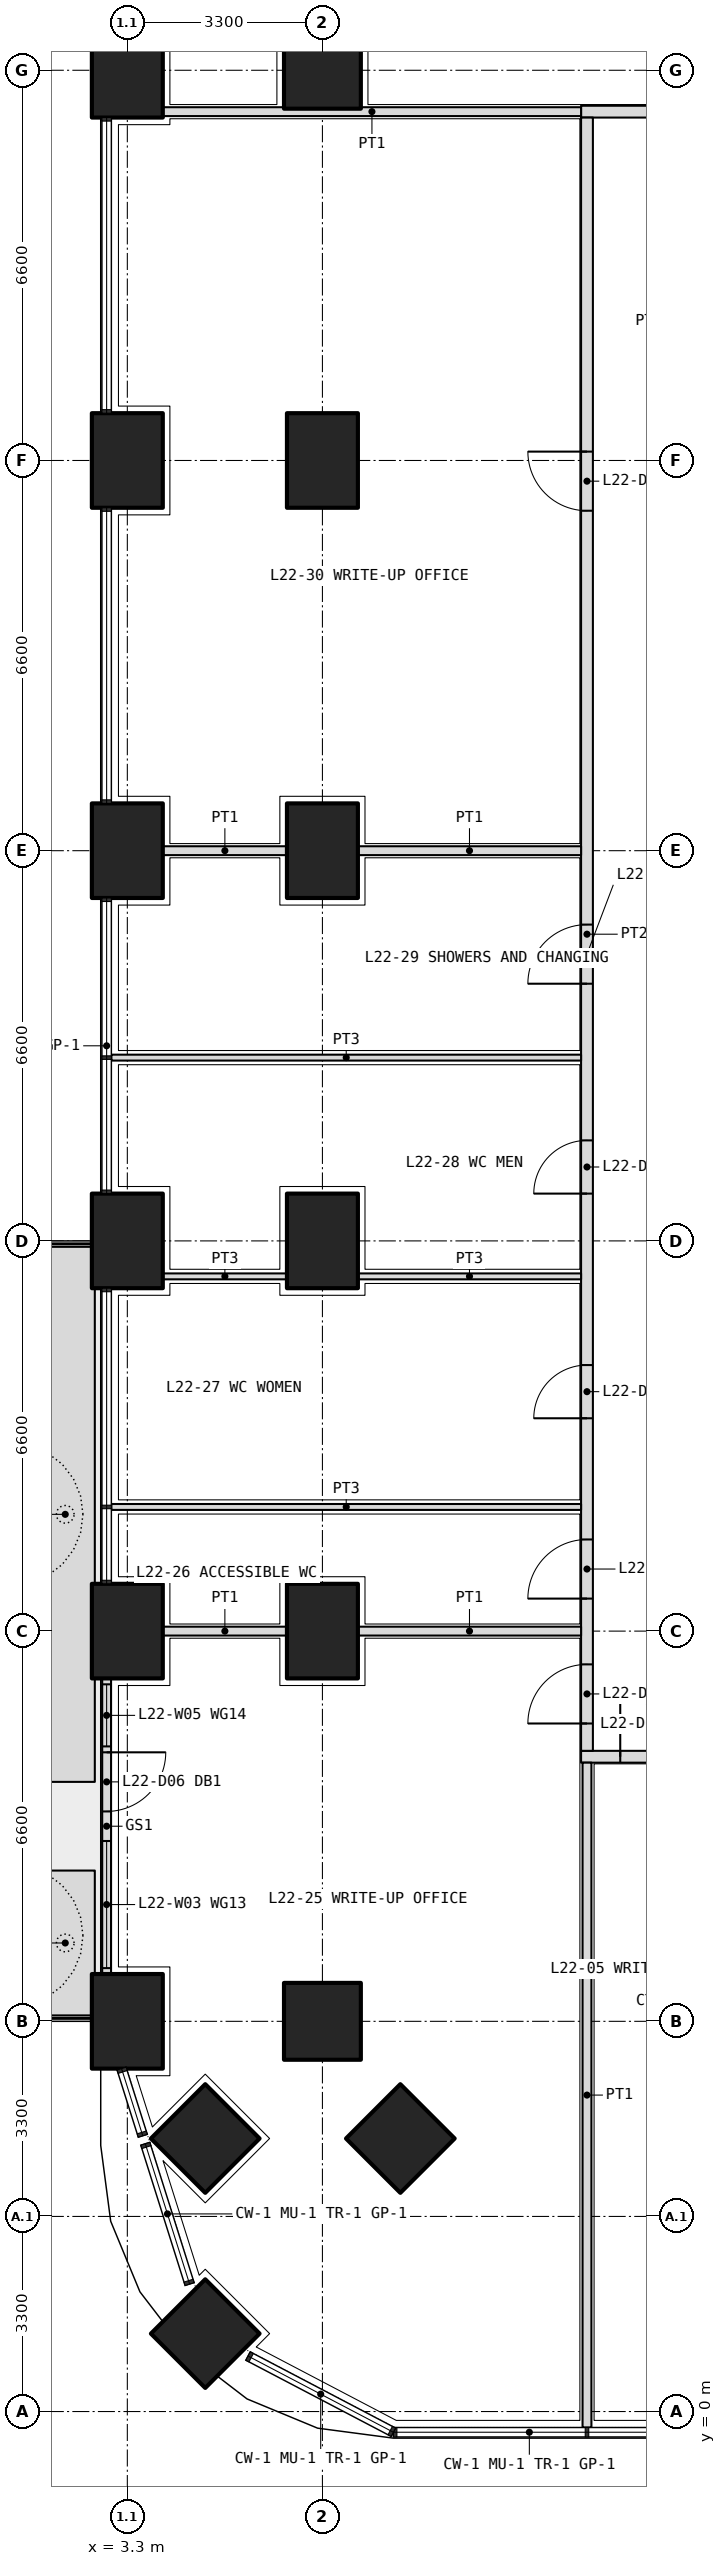
"""IFC4 building model, lengths in metres.
Left out: names, types, materials, properties, quantities, classifications, styles, units other than length and angle.
Written with IfcOpenShell. Run it as: python <this file> out.ifc"""

import sys

from ifc_helpers import new_model, si_unit, direction, frame, frame_2d, origin, origin_2d, place, context, subcontext, project, spatial, polyline, rectangle, outline, extrude, element, fill, save


model = new_model("IFC4")
c1 = context("Model", 3, precision=1e-05, world=origin(), true_north=direction((0.0, 1.0)))
c2 = subcontext(c1, "Body", "Model", "MODEL_VIEW")
j1 = project(units=[si_unit("LENGTHUNIT", "METRE"), si_unit("PLANEANGLEUNIT", "RADIAN")], contexts=[c1])
p1 = place(None, origin())
s1 = spatial("IfcSite", under=j1, at=p1, CompositionType="ELEMENT")
p2 = place(p1, origin())
s2 = spatial("IfcBuilding", under=s1, at=p2, CompositionType="ELEMENT")
p3 = place(p2, frame((0.0, 0.0, 99.0)))
s3 = spatial("IfcBuildingStorey", under=s2, at=p3, CompositionType="ELEMENT", Elevation=99.0)
p4 = place(p3, frame((4.618, 1.318, 0.0), z_axis=(0.0, 0.0, 1.0), x_axis=(0.707106781187, 0.707106781187, 0.0)))
e1 = element("IfcColumn", 1, at=p4, inside=s3, PredefinedType="COLUMN", context=c2, shape_type="SweptSolid", body=[
    extrude(rectangle(XDim=1.3, YDim=1.3, at=origin_2d()), origin(), (0.0, 0.0, 1.0), 4.2),
])
for number, where, z_axis, x_axis in (
    (2, (3.3, 6.6, 0.0), (0.0, 0.0, 1.0), (0.0, 1.0, 0.0)),
    (3, (3.3, 13.2, 0.0), (0.0, 0.0, 1.0), (0.0, 1.0, 0.0)),
    (4, (3.3, 19.8, 0.0), (0.0, 0.0, 1.0), (0.0, 1.0, 0.0)),
    (5, (3.3, 26.4, 0.0), (0.0, 0.0, 1.0), (0.0, 1.0, 0.0)),
    (6, (3.3, 33.0, 0.0), (0.0, 0.0, 1.0), (0.0, 1.0, 0.0)),
    (7, (3.3, 39.6, 0.0), (0.0, 0.0, 1.0), (0.0, 1.0, 0.0)),
):
    element("IfcColumn", number, at=place(p3, frame(where, z_axis=z_axis, x_axis=x_axis)), inside=s3, PredefinedType="COLUMN", context=c2, shape_type="SweptSolid", body=[
        extrude(rectangle(XDim=1.6, YDim=1.2, at=origin_2d()), origin(), (0.0, 0.0, 1.0), 4.2),
    ])
for number, where, z_axis, x_axis in (
    (8, (6.6, 6.6, 0.0), (0.0, 0.0, 1.0), (1.0, 0.0, 0.0)),
    (9, (6.6, 39.6, 0.0), (0.0, 0.0, 1.0), (1.0, 0.0, 0.0)),
    (10, (4.618, 4.618, 0.0), (0.0, 0.0, 1.0), (0.707, 0.707, 0.0)),
    (11, (7.918, 4.618, 0.0), (0.0, 0.0, 1.0), (0.707, 0.707, 0.0)),
):
    element("IfcColumn", number, at=place(p3, frame(where, z_axis=z_axis, x_axis=x_axis)), inside=s3, PredefinedType="COLUMN", context=c2, shape_type="SweptSolid", body=[
        extrude(rectangle(XDim=1.3, YDim=1.3, at=origin_2d()), origin(), (0.0, 0.0, 1.0), 4.2),
    ])
for number, where, z_axis, x_axis in (
    (12, (6.6, 13.2, 0.0), (0.0, 0.0, 1.0), (0.0, 1.0, 0.0)),
    (13, (6.6, 19.8, 0.0), (0.0, 0.0, 1.0), (0.0, 1.0, 0.0)),
    (14, (6.6, 26.4, 0.0), (0.0, 0.0, 1.0), (0.0, 1.0, 0.0)),
    (15, (6.6, 33.0, 0.0), (0.0, 0.0, 1.0), (0.0, 1.0, 0.0)),
):
    element("IfcColumn", number, at=place(p3, frame(where, z_axis=z_axis, x_axis=x_axis)), inside=s3, PredefinedType="COLUMN", context=c2, shape_type="SweptSolid", body=[
        extrude(rectangle(XDim=1.6, YDim=1.2, at=origin_2d()), origin(), (0.0, 0.0, 1.0), 4.2),
    ])
p5 = place(p3, origin())
e16 = element("IfcWall", 16, at=p5, inside=s3, PredefinedType="USERDEFINED", context=c2, shape_type="SweptSolid", body=[
    extrude(outline(polyline([(1.75, 6.7), (2.75, 6.7), (2.75, 9.15), (1.75, 9.15), (1.75, 6.7)]), holes=[polyline([(1.9, 6.85), (2.6, 6.85), (2.6, 9.0), (1.9, 9.0), (1.9, 6.85)])]), origin(), (0.0, 0.0, 1.0), 1.05),
])
p6 = place(p3, origin())
e17 = element("IfcWall", 17, at=p6, inside=s3, PredefinedType="USERDEFINED", context=c2, shape_type="SweptSolid", body=[
    extrude(outline(polyline([(1.75, 10.65), (2.75, 10.65), (2.75, 19.7), (1.75, 19.7), (1.75, 10.65)]), holes=[polyline([(1.9, 10.8), (2.6, 10.8), (2.6, 19.55), (1.9, 19.55), (1.9, 10.8)])]), origin(), (0.0, 0.0, 1.0), 1.05),
])
p7 = place(p3, frame((2.95, 12.4, 0.0), z_axis=(0.0, 0.0, 1.0), x_axis=(0.0, -1.0, 0.0)))
e18 = element("IfcWall", 18, at=p7, inside=s3, PredefinedType="SOLIDWALL", context=c2, shape_type="SweptSolid", body=[
    extrude(rectangle(XDim=5.0, YDim=0.15, at=frame_2d((2.5, 0.0))), origin(), (0.0, 0.0, 1.0), 2.7),
])
p8 = place(p7, frame((1.25, 0.0, 0.0)))
e19 = element("IfcOpeningElement", 19, at=p8, cuts=e18, PredefinedType="OPENING", context=c2, shape_type="SweptSolid", body=[
    extrude(rectangle(XDim=1.0, YDim=2.4, at=frame_2d((0.5, 1.2))), frame((0.0, 0.085, 0.0), z_axis=(0.0, -1.0, 0.0), x_axis=(1.0, 0.0, 0.0)), (0.0, 0.0, 1.0), 0.17),
])
p9 = place(p7, frame((0.1, 0.0, 0.1)))
e20 = element("IfcOpeningElement", 20, at=p9, cuts=e18, PredefinedType="OPENING", context=c2, shape_type="SweptSolid", body=[
    extrude(rectangle(XDim=1.05, YDim=2.3, at=frame_2d((0.525, 1.15))), frame((0.0, 0.085, 0.0), z_axis=(0.0, -1.0, 0.0), x_axis=(1.0, 0.0, 0.0)), (0.0, 0.0, 1.0), 0.17),
])
p10 = place(p7, frame((2.75, 0.0, 0.1)))
e21 = element("IfcOpeningElement", 21, at=p10, cuts=e18, PredefinedType="OPENING", context=c2, shape_type="SweptSolid", body=[
    extrude(rectangle(XDim=2.15, YDim=2.3, at=frame_2d((1.075, 1.15))), frame((0.0, 0.085, 0.0), z_axis=(0.0, -1.0, 0.0), x_axis=(1.0, 0.0, 0.0)), (0.0, 0.0, 1.0), 0.17),
])
p11 = place(p3, frame((10.975, 11.075, 0.0), z_axis=(0.0, 0.0, 1.0), x_axis=(1.0, 0.0, 0.0)))
e22 = element("IfcWall", 22, at=p11, inside=s3, PredefinedType="PARTITIONING", context=c2, shape_type="SweptSolid", body=[
    extrude(rectangle(XDim=30.85, YDim=0.2, at=frame_2d((15.425, 0.0))), origin(), (0.0, 0.0, 1.0), 2.85),
])
p12 = place(p11, frame((0.663, 0.0, 0.0)))
e23 = element("IfcOpeningElement", 23, at=p12, cuts=e22, PredefinedType="OPENING", context=c2, shape_type="SweptSolid", body=[
    extrude(rectangle(XDim=1.0, YDim=2.1, at=frame_2d((0.5, 1.05))), frame((0.0, 0.11, 0.0), z_axis=(0.0, -1.0, 0.0), x_axis=(1.0, 0.0, 0.0)), (0.0, 0.0, 1.0), 0.22),
])
p13 = place(p11, frame((3.275, 0.0, 0.0)))
e24 = element("IfcOpeningElement", 24, at=p13, cuts=e22, PredefinedType="OPENING", context=c2, shape_type="SweptSolid", body=[
    extrude(rectangle(XDim=1.2, YDim=2.1, at=frame_2d((0.6, 1.05))), frame((0.0, 0.11, 0.0), z_axis=(0.0, -1.0, 0.0), x_axis=(1.0, 0.0, 0.0)), (0.0, 0.0, 1.0), 0.22),
])
p14 = place(p11, frame((8.325, 0.0, 0.0)))
e25 = element("IfcOpeningElement", 25, at=p14, cuts=e22, PredefinedType="OPENING", context=c2, shape_type="SweptSolid", body=[
    extrude(rectangle(XDim=1.0, YDim=2.1, at=frame_2d((0.5, 1.05))), frame((0.0, 0.11, 0.0), z_axis=(0.0, -1.0, 0.0), x_axis=(1.0, 0.0, 0.0)), (0.0, 0.0, 1.0), 0.22),
])
p15 = place(p11, frame((13.275, 0.0, 0.0)))
e26 = element("IfcOpeningElement", 26, at=p15, cuts=e22, PredefinedType="OPENING", context=c2, shape_type="SweptSolid", body=[
    extrude(rectangle(XDim=1.0, YDim=2.1, at=frame_2d((0.5, 1.05))), frame((0.0, 0.11, 0.0), z_axis=(0.0, -1.0, 0.0), x_axis=(1.0, 0.0, 0.0)), (0.0, 0.0, 1.0), 0.22),
])
p16 = place(p11, frame((17.025, 0.0, 0.0)))
e27 = element("IfcOpeningElement", 27, at=p16, cuts=e22, PredefinedType="OPENING", context=c2, shape_type="SweptSolid", body=[
    extrude(rectangle(XDim=1.0, YDim=2.1, at=frame_2d((0.5, 1.05))), frame((0.0, 0.11, 0.0), z_axis=(0.0, -1.0, 0.0), x_axis=(1.0, 0.0, 0.0)), (0.0, 0.0, 1.0), 0.22),
])
p17 = place(p11, frame((20.325, 0.0, 0.0)))
e28 = element("IfcOpeningElement", 28, at=p17, cuts=e22, PredefinedType="OPENING", context=c2, shape_type="SweptSolid", body=[
    extrude(rectangle(XDim=1.0, YDim=2.1, at=frame_2d((0.5, 1.05))), frame((0.0, 0.11, 0.0), z_axis=(0.0, -1.0, 0.0), x_axis=(1.0, 0.0, 0.0)), (0.0, 0.0, 1.0), 0.22),
])
p18 = place(p11, frame((25.887, 0.0, 0.0)))
e29 = element("IfcOpeningElement", 29, at=p18, cuts=e22, PredefinedType="OPENING", context=c2, shape_type="SweptSolid", body=[
    extrude(rectangle(XDim=1.0, YDim=2.1, at=frame_2d((0.5, 1.05))), frame((0.0, 0.11, 0.0), z_axis=(0.0, -1.0, 0.0), x_axis=(1.0, 0.0, 0.0)), (0.0, 0.0, 1.0), 0.22),
])
p19 = place(p3, frame((10.975, 38.9, 0.0), z_axis=(0.0, 0.0, 1.0), x_axis=(1.0, 0.0, 0.0)))
e30 = element("IfcWall", 30, at=p19, inside=s3, PredefinedType="PARTITIONING", context=c2, shape_type="SweptSolid", body=[
    extrude(rectangle(XDim=30.85, YDim=0.2, at=frame_2d((15.425, 0.0))), origin(), (0.0, 0.0, 1.0), 2.85),
])
p20 = place(p19, frame((5.613, 0.0, 0.0)))
e31 = element("IfcOpeningElement", 31, at=p20, cuts=e30, PredefinedType="OPENING", context=c2, shape_type="SweptSolid", body=[
    extrude(rectangle(XDim=1.0, YDim=2.1, at=frame_2d((0.5, 1.05))), frame((0.0, 0.11, 0.0), z_axis=(0.0, -1.0, 0.0), x_axis=(1.0, 0.0, 0.0)), (0.0, 0.0, 1.0), 0.22),
])
p21 = place(p19, frame((16.575, 0.0, 0.0)))
e32 = element("IfcOpeningElement", 32, at=p21, cuts=e30, PredefinedType="OPENING", context=c2, shape_type="SweptSolid", body=[
    extrude(rectangle(XDim=1.0, YDim=2.1, at=frame_2d((0.5, 1.05))), frame((0.0, 0.11, 0.0), z_axis=(0.0, -1.0, 0.0), x_axis=(1.0, 0.0, 0.0)), (0.0, 0.0, 1.0), 0.22),
])
p22 = place(p19, frame((23.175, 0.0, 0.0)))
e33 = element("IfcOpeningElement", 33, at=p22, cuts=e30, PredefinedType="OPENING", context=c2, shape_type="SweptSolid", body=[
    extrude(rectangle(XDim=1.0, YDim=2.1, at=frame_2d((0.5, 1.05))), frame((0.0, 0.11, 0.0), z_axis=(0.0, -1.0, 0.0), x_axis=(1.0, 0.0, 0.0)), (0.0, 0.0, 1.0), 0.22),
])
p23 = place(p19, frame((27.538, 0.0, 0.0)))
e34 = element("IfcOpeningElement", 34, at=p23, cuts=e30, PredefinedType="OPENING", context=c2, shape_type="SweptSolid", body=[
    extrude(rectangle(XDim=1.0, YDim=2.1, at=frame_2d((0.5, 1.05))), frame((0.0, 0.11, 0.0), z_axis=(0.0, -1.0, 0.0), x_axis=(1.0, 0.0, 0.0)), (0.0, 0.0, 1.0), 0.22),
])
p24 = place(p3, frame((11.075, 11.175, 0.0), z_axis=(0.0, 0.0, 1.0), x_axis=(0.0, 1.0, 0.0)))
e35 = element("IfcWall", 35, at=p24, inside=s3, PredefinedType="PARTITIONING", context=c2, shape_type="SweptSolid", body=[
    extrude(rectangle(XDim=27.625, YDim=0.2, at=frame_2d((13.812, 0.0))), origin(), (0.0, 0.0, 1.0), 2.85),
])
p25 = place(p24, frame((0.462, 0.0, 0.0)))
e36 = element("IfcOpeningElement", 36, at=p25, cuts=e35, PredefinedType="OPENING", context=c2, shape_type="SweptSolid", body=[
    extrude(rectangle(XDim=1.0, YDim=2.1, at=frame_2d((0.5, 1.05))), frame((0.0, 0.11, 0.0), z_axis=(0.0, -1.0, 0.0), x_axis=(1.0, 0.0, 0.0)), (0.0, 0.0, 1.0), 0.22),
])
p26 = place(p24, frame((2.575, 0.0, 0.0)))
e37 = element("IfcOpeningElement", 37, at=p26, cuts=e35, PredefinedType="OPENING", context=c2, shape_type="SweptSolid", body=[
    extrude(rectangle(XDim=1.0, YDim=2.1, at=frame_2d((0.5, 1.05))), frame((0.0, 0.11, 0.0), z_axis=(0.0, -1.0, 0.0), x_axis=(1.0, 0.0, 0.0)), (0.0, 0.0, 1.0), 0.22),
])
p27 = place(p24, frame((5.625, 0.0, 0.0)))
e38 = element("IfcOpeningElement", 38, at=p27, cuts=e35, PredefinedType="OPENING", context=c2, shape_type="SweptSolid", body=[
    extrude(rectangle(XDim=0.9, YDim=2.1, at=frame_2d((0.45, 1.05))), frame((0.0, 0.11, 0.0), z_axis=(0.0, -1.0, 0.0), x_axis=(1.0, 0.0, 0.0)), (0.0, 0.0, 1.0), 0.22),
])
p28 = place(p24, frame((9.425, 0.0, 0.0)))
e39 = element("IfcOpeningElement", 39, at=p28, cuts=e35, PredefinedType="OPENING", context=c2, shape_type="SweptSolid", body=[
    extrude(rectangle(XDim=0.9, YDim=2.1, at=frame_2d((0.45, 1.05))), frame((0.0, 0.11, 0.0), z_axis=(0.0, -1.0, 0.0), x_axis=(1.0, 0.0, 0.0)), (0.0, 0.0, 1.0), 0.22),
])
p29 = place(p24, frame((12.975, 0.0, 0.0)))
e40 = element("IfcOpeningElement", 40, at=p29, cuts=e35, PredefinedType="OPENING", context=c2, shape_type="SweptSolid", body=[
    extrude(rectangle(XDim=1.0, YDim=2.1, at=frame_2d((0.5, 1.05))), frame((0.0, 0.11, 0.0), z_axis=(0.0, -1.0, 0.0), x_axis=(1.0, 0.0, 0.0)), (0.0, 0.0, 1.0), 0.22),
])
p30 = place(p24, frame((20.975, 0.0, 0.0)))
e41 = element("IfcOpeningElement", 41, at=p30, cuts=e35, PredefinedType="OPENING", context=c2, shape_type="SweptSolid", body=[
    extrude(rectangle(XDim=1.0, YDim=2.1, at=frame_2d((0.5, 1.05))), frame((0.0, 0.11, 0.0), z_axis=(0.0, -1.0, 0.0), x_axis=(1.0, 0.0, 0.0)), (0.0, 0.0, 1.0), 0.22),
])
p31 = place(p3, frame((11.075, -0.27, 0.0), z_axis=(0.0, 0.0, 1.0), x_axis=(0.0, 1.0, 0.0)))
e42 = element("IfcWall", 42, at=p31, inside=s3, PredefinedType="PARTITIONING", context=c2, shape_type="SweptSolid", body=[
    extrude(rectangle(XDim=11.245, YDim=0.15, at=frame_2d((5.623, 0.0))), origin(), (0.0, 0.0, 1.0), 2.7),
])
p32 = place(p3, frame((3.9, 38.9, 0.0), z_axis=(0.0, 0.0, 1.0), x_axis=(1.0, 0.0, 0.0)))
e43 = element("IfcWall", 43, at=p32, inside=s3, PredefinedType="PARTITIONING", context=c2, shape_type="SweptSolid", body=[
    extrude(rectangle(XDim=7.075, YDim=0.15, at=frame_2d((3.538, 0.0))), origin(), (0.0, 0.0, 1.0), 2.85),
])
p33 = place(p3, frame((3.03, 15.3, 0.0), z_axis=(0.0, 0.0, 1.0), x_axis=(1.0, 0.0, 0.0)))
e44 = element("IfcWall", 44, at=p33, inside=s3, PredefinedType="PARTITIONING", context=c2, shape_type="SweptSolid", body=[
    extrude(rectangle(XDim=7.945, YDim=0.1, at=frame_2d((3.973, 0.0))), origin(), (0.0, 0.0, 1.0), 2.7),
])
p34 = place(p3, frame((3.9, 19.2, 0.0), z_axis=(0.0, 0.0, 1.0), x_axis=(1.0, 0.0, 0.0)))
e45 = element("IfcWall", 45, at=p34, inside=s3, PredefinedType="PARTITIONING", context=c2, shape_type="SweptSolid", body=[
    extrude(rectangle(XDim=2.1, YDim=0.1, at=frame_2d((1.05, 0.0))), origin(), (0.0, 0.0, 1.0), 2.85),
])
p35 = place(p3, frame((7.2, 19.2, 0.0), z_axis=(0.0, 0.0, 1.0), x_axis=(1.0, 0.0, 0.0)))
e46 = element("IfcWall", 46, at=p35, inside=s3, PredefinedType="PARTITIONING", context=c2, shape_type="SweptSolid", body=[
    extrude(rectangle(XDim=3.775, YDim=0.1, at=frame_2d((1.888, 0.0))), origin(), (0.0, 0.0, 1.0), 2.85),
])
p36 = place(p3, frame((3.03, 22.9, 0.0), z_axis=(0.0, 0.0, 1.0), x_axis=(1.0, 0.0, 0.0)))
e47 = element("IfcWall", 47, at=p36, inside=s3, PredefinedType="PARTITIONING", context=c2, shape_type="SweptSolid", body=[
    extrude(rectangle(XDim=7.945, YDim=0.1, at=frame_2d((3.973, 0.0))), origin(), (0.0, 0.0, 1.0), 2.7),
])
p37 = place(p3, frame((3.9, 13.2, 0.0), z_axis=(0.0, 0.0, 1.0), x_axis=(1.0, 0.0, 0.0)))
e48 = element("IfcWall", 48, at=p37, inside=s3, PredefinedType="PARTITIONING", context=c2, shape_type="SweptSolid", body=[
    extrude(rectangle(XDim=2.1, YDim=0.15, at=frame_2d((1.05, 0.0))), origin(), (0.0, 0.0, 1.0), 2.85),
])
p38 = place(p3, frame((7.2, 13.2, 0.0), z_axis=(0.0, 0.0, 1.0), x_axis=(1.0, 0.0, 0.0)))
e49 = element("IfcWall", 49, at=p38, inside=s3, PredefinedType="PARTITIONING", context=c2, shape_type="SweptSolid", body=[
    extrude(rectangle(XDim=3.775, YDim=0.15, at=frame_2d((1.888, 0.0))), origin(), (0.0, 0.0, 1.0), 2.85),
])
p39 = place(p3, frame((3.9, 26.4, 0.0), z_axis=(0.0, 0.0, 1.0), x_axis=(1.0, 0.0, 0.0)))
e50 = element("IfcWall", 50, at=p39, inside=s3, PredefinedType="PARTITIONING", context=c2, shape_type="SweptSolid", body=[
    extrude(rectangle(XDim=2.1, YDim=0.15, at=frame_2d((1.05, 0.0))), origin(), (0.0, 0.0, 1.0), 2.85),
])
p40 = place(p3, frame((7.2, 26.4, 0.0), z_axis=(0.0, 0.0, 1.0), x_axis=(1.0, 0.0, 0.0)))
e51 = element("IfcWall", 51, at=p40, inside=s3, PredefinedType="PARTITIONING", context=c2, shape_type="SweptSolid", body=[
    extrude(rectangle(XDim=3.775, YDim=0.15, at=frame_2d((1.888, 0.0))), origin(), (0.0, 0.0, 1.0), 2.85),
])
p41 = place(p8, origin())
e52 = element("IfcDoor", 52, at=p41, inside=s3, OperationType="SINGLE_SWING_LEFT", PredefinedType="DOOR", context=c2, shape_type="SweptSolid", body=[
    extrude(rectangle(XDim=1.0, YDim=2.4, at=frame_2d((0.5, 1.2))), frame((0.0, 0.025, 0.0), z_axis=(0.0, -1.0, 0.0), x_axis=(1.0, 0.0, 0.0)), (0.0, 0.0, 1.0), 0.05),
])
fill(e19, e52)
p42 = place(p9, origin())
e53 = element("IfcWindow", 53, at=p42, inside=s3, PartitioningType="SINGLE_PANEL", PredefinedType="WINDOW", context=c2, shape_type="SweptSolid", body=[
    extrude(rectangle(XDim=1.05, YDim=2.3, at=frame_2d((0.525, 1.15))), frame((0.0, 0.03, 0.0), z_axis=(0.0, -1.0, 0.0), x_axis=(1.0, 0.0, 0.0)), (0.0, 0.0, 1.0), 0.06),
])
fill(e20, e53)
p43 = place(p10, origin())
e54 = element("IfcWindow", 54, at=p43, inside=s3, PartitioningType="SINGLE_PANEL", PredefinedType="WINDOW", context=c2, shape_type="SweptSolid", body=[
    extrude(rectangle(XDim=2.15, YDim=2.3, at=frame_2d((1.075, 1.15))), frame((0.0, 0.03, 0.0), z_axis=(0.0, -1.0, 0.0), x_axis=(1.0, 0.0, 0.0)), (0.0, 0.0, 1.0), 0.06),
])
fill(e21, e54)
p44 = place(p12, origin())
e55 = element("IfcDoor", 55, at=p44, inside=s3, OperationType="SINGLE_SWING_LEFT", PredefinedType="DOOR", context=c2, shape_type="SweptSolid", body=[
    extrude(rectangle(XDim=1.0, YDim=2.1, at=frame_2d((0.5, 1.05))), frame((0.0, 0.025, 0.0), z_axis=(0.0, -1.0, 0.0), x_axis=(1.0, 0.0, 0.0)), (0.0, 0.0, 1.0), 0.05),
])
fill(e23, e55)
p45 = place(p25, origin())
e56 = element("IfcDoor", 56, at=p45, inside=s3, OperationType="SINGLE_SWING_LEFT", PredefinedType="DOOR", context=c2, shape_type="SweptSolid", body=[
    extrude(rectangle(XDim=1.0, YDim=2.1, at=frame_2d((0.5, 1.05))), frame((0.0, 0.025, 0.0), z_axis=(0.0, -1.0, 0.0), x_axis=(1.0, 0.0, 0.0)), (0.0, 0.0, 1.0), 0.05),
])
fill(e36, e56)
p46 = place(p26, origin())
e57 = element("IfcDoor", 57, at=p46, inside=s3, OperationType="SINGLE_SWING_LEFT", PredefinedType="DOOR", context=c2, shape_type="SweptSolid", body=[
    extrude(rectangle(XDim=1.0, YDim=2.1, at=frame_2d((0.5, 1.05))), frame((0.0, 0.025, 0.0), z_axis=(0.0, -1.0, 0.0), x_axis=(1.0, 0.0, 0.0)), (0.0, 0.0, 1.0), 0.05),
])
fill(e37, e57)
p47 = place(p27, origin())
e58 = element("IfcDoor", 58, at=p47, inside=s3, OperationType="SINGLE_SWING_LEFT", PredefinedType="DOOR", context=c2, shape_type="SweptSolid", body=[
    extrude(rectangle(XDim=0.9, YDim=2.1, at=frame_2d((0.45, 1.05))), frame((0.0, 0.025, 0.0), z_axis=(0.0, -1.0, 0.0), x_axis=(1.0, 0.0, 0.0)), (0.0, 0.0, 1.0), 0.05),
])
fill(e38, e58)
p48 = place(p28, origin())
e59 = element("IfcDoor", 59, at=p48, inside=s3, OperationType="SINGLE_SWING_LEFT", PredefinedType="DOOR", context=c2, shape_type="SweptSolid", body=[
    extrude(rectangle(XDim=0.9, YDim=2.1, at=frame_2d((0.45, 1.05))), frame((0.0, 0.025, 0.0), z_axis=(0.0, -1.0, 0.0), x_axis=(1.0, 0.0, 0.0)), (0.0, 0.0, 1.0), 0.05),
])
fill(e39, e59)
p49 = place(p29, origin())
e60 = element("IfcDoor", 60, at=p49, inside=s3, OperationType="SINGLE_SWING_LEFT", PredefinedType="DOOR", context=c2, shape_type="SweptSolid", body=[
    extrude(rectangle(XDim=1.0, YDim=2.1, at=frame_2d((0.5, 1.05))), frame((0.0, 0.025, 0.0), z_axis=(0.0, -1.0, 0.0), x_axis=(1.0, 0.0, 0.0)), (0.0, 0.0, 1.0), 0.05),
])
fill(e40, e60)
p50 = place(p30, origin())
e61 = element("IfcDoor", 61, at=p50, inside=s3, OperationType="SINGLE_SWING_RIGHT", PredefinedType="DOOR", context=c2, shape_type="SweptSolid", body=[
    extrude(rectangle(XDim=1.0, YDim=2.1, at=frame_2d((0.5, 1.05))), frame((0.0, 0.025, 0.0), z_axis=(0.0, -1.0, 0.0), x_axis=(1.0, 0.0, 0.0)), (0.0, 0.0, 1.0), 0.05),
])
fill(e41, e61)
save(model, sys.argv[1])
